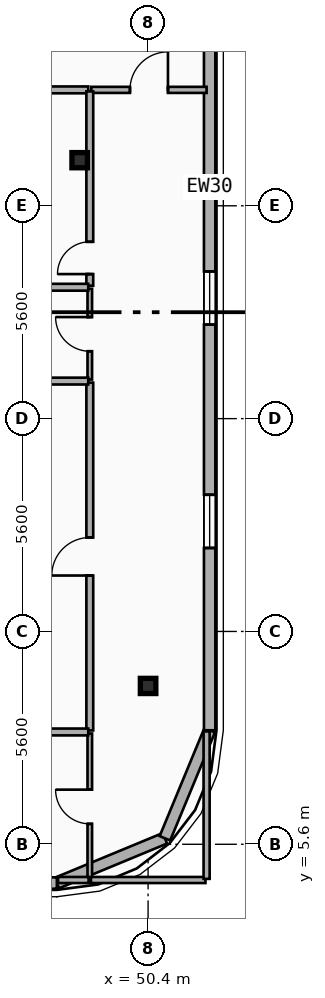
"""IFC4 building model, lengths in metres.
Left out: names, types, materials, properties, quantities, classifications, styles, units other than length and angle.
Written with IfcOpenShell. Run it as: python <this file> out.ifc"""

import sys

from ifc_helpers import new_model, si_unit, direction, frame, frame_2d, origin, origin_2d, place, context, subcontext, project, spatial, rectangle, i_section, extrude, element, fill, save


model = new_model("IFC4")
c1 = context("Model", 3, precision=1e-05, world=origin(), true_north=direction((0.0, 1.0)))
c2 = subcontext(c1, "Body", "Model", "MODEL_VIEW")
j1 = project(units=[si_unit("LENGTHUNIT", "METRE"), si_unit("PLANEANGLEUNIT", "RADIAN")], contexts=[c1])
p1 = place(None, origin())
s1 = spatial("IfcSite", under=j1, at=p1, CompositionType="ELEMENT")
p2 = place(p1, origin())
s2 = spatial("IfcBuilding", under=s1, at=p2, CompositionType="ELEMENT")
p3 = place(p2, frame((0.0, 0.0, 200.4)))
s3 = spatial("IfcBuildingStorey", under=s2, at=p3, CompositionType="ELEMENT", Elevation=200.4)
p4 = place(p3, frame((48.6, 23.6, 0.0), z_axis=(0.0, 0.0, 1.0), x_axis=(1.0, 0.0, 0.0)))
e1 = element("IfcColumn", 1, at=p4, inside=s3, PredefinedType="COLUMN", context=c2, shape_type="SweptSolid", body=[
    extrude(i_section(OverallWidth=0.408, OverallDepth=0.4, WebThickness=0.025, FlangeThickness=0.039, FilletRadius=0.015, at=origin_2d()), origin(), (0.0, 0.0, 1.0), 3.6),
])
p5 = place(p3, frame((50.4, 9.862, 0.0), z_axis=(0.0, -0.079833884609, 0.996808181582), x_axis=(1.0, 0.0, 0.0)))
e2 = element("IfcColumn", 2, at=p5, inside=s3, PredefinedType="COLUMN", context=c2, shape_type="SweptSolid", body=[
    extrude(i_section(OverallWidth=0.408, OverallDepth=0.4, WebThickness=0.025, FlangeThickness=0.039, FilletRadius=0.015, at=origin_2d()), origin(), (0.0, 0.0, 1.0), 3.612),
])
p6 = place(p3, frame((50.843, 5.757, 0.0), z_axis=(0.0, 0.0, 1.0), x_axis=(-0.92389884758, -0.382636798336, 0.0)))
e3 = element("IfcWall", 3, at=p6, inside=s3, PredefinedType="SOLIDWALL", context=c2, shape_type="SweptSolid", body=[
    extrude(rectangle(XDim=3.077, YDim=0.3, at=frame_2d((1.538, 0.0))), origin(), (0.0, 0.0, 1.0), 3.34),
])
p7 = place(p3, frame((52.02, 8.6, 0.0), z_axis=(0.0, 0.0, 1.0), x_axis=(-0.382676475685, -0.923882414032, 0.0)))
e4 = element("IfcWall", 4, at=p7, inside=s3, PredefinedType="SOLIDWALL", context=c2, shape_type="SweptSolid", body=[
    extrude(rectangle(XDim=3.077, YDim=0.3, at=frame_2d((1.539, 0.0))), origin(), (0.0, 0.0, 1.0), 3.34),
])
p8 = place(p3, frame((52.02, 37.2, 0.0), z_axis=(0.0, 0.0, 1.0), x_axis=(0.0, -1.0, 0.0)))
e5 = element("IfcWall", 5, at=p8, inside=s3, PredefinedType="SOLIDWALL", context=c2, shape_type="SweptSolid", body=[
    extrude(rectangle(XDim=28.6, YDim=0.3, at=frame_2d((14.3, 0.0))), origin(), (0.0, 0.0, 1.0), 3.34),
])
p9 = place(p8, frame((2.38, 0.0, 0.34)))
e6 = element("IfcOpeningElement", 6, at=p9, cuts=e5, PredefinedType="OPENING", context=c2, shape_type="SweptSolid", body=[
    extrude(rectangle(XDim=1.4, YDim=2.1, at=frame_2d((0.7, 1.05))), frame((0.0, 0.16, 0.0), z_axis=(0.0, -1.0, 0.0), x_axis=(1.0, 0.0, 0.0)), (0.0, 0.0, 1.0), 0.32),
])
p10 = place(p8, frame((5.84, 0.0, 0.34)))
e7 = element("IfcOpeningElement", 7, at=p10, cuts=e5, PredefinedType="OPENING", context=c2, shape_type="SweptSolid", body=[
    extrude(rectangle(XDim=1.4, YDim=2.1, at=frame_2d((0.7, 1.05))), frame((0.0, 0.16, 0.0), z_axis=(0.0, -1.0, 0.0), x_axis=(1.0, 0.0, 0.0)), (0.0, 0.0, 1.0), 0.32),
])
p11 = place(p8, frame((16.527, 0.0, 0.34)))
e8 = element("IfcOpeningElement", 8, at=p11, cuts=e5, PredefinedType="OPENING", context=c2, shape_type="SweptSolid", body=[
    extrude(rectangle(XDim=1.4, YDim=2.1, at=frame_2d((0.7, 1.05))), frame((0.0, 0.16, 0.0), z_axis=(0.0, -1.0, 0.0), x_axis=(1.0, 0.0, 0.0)), (0.0, 0.0, 1.0), 0.32),
])
p12 = place(p8, frame((22.403, 0.0, 0.34)))
e9 = element("IfcOpeningElement", 9, at=p12, cuts=e5, PredefinedType="OPENING", context=c2, shape_type="SweptSolid", body=[
    extrude(rectangle(XDim=1.4, YDim=2.1, at=frame_2d((0.7, 1.05))), frame((0.0, 0.16, 0.0), z_axis=(0.0, -1.0, 0.0), x_axis=(1.0, 0.0, 0.0)), (0.0, 0.0, 1.0), 0.32),
])
p13 = place(p3, frame((48.0, 4.58, 0.0), z_axis=(0.0, 0.0, 1.0), x_axis=(-1.0, 0.0, 0.0)))
e10 = element("IfcWall", 10, at=p13, inside=s3, PredefinedType="SOLIDWALL", context=c2, shape_type="SweptSolid", body=[
    extrude(rectangle(XDim=38.4, YDim=0.3, at=frame_2d((19.2, 0.0))), origin(), (0.0, 0.0, 1.0), 3.34),
])
p14 = place(p13, frame((36.19, 0.0, 0.8)))
e11 = element("IfcOpeningElement", 11, at=p14, cuts=e10, PredefinedType="OPENING", context=c2, shape_type="SweptSolid", body=[
    extrude(rectangle(XDim=1.8, YDim=1.8, at=frame_2d((0.9, 0.9))), frame((0.0, 0.16, 0.0), z_axis=(0.0, -1.0, 0.0), x_axis=(1.0, 0.0, 0.0)), (0.0, 0.0, 1.0), 0.32),
])
p15 = place(p13, frame((29.712, 0.0, 0.7)))
e12 = element("IfcOpeningElement", 12, at=p15, cuts=e10, PredefinedType="OPENING", context=c2, shape_type="SweptSolid", body=[
    extrude(rectangle(XDim=2.0, YDim=2.2, at=frame_2d((1.0, 1.1))), frame((0.0, 0.16, 0.0), z_axis=(0.0, -1.0, 0.0), x_axis=(1.0, 0.0, 0.0)), (0.0, 0.0, 1.0), 0.32),
])
p16 = place(p13, frame((33.038, 0.0, 0.7)))
e13 = element("IfcOpeningElement", 13, at=p16, cuts=e10, PredefinedType="OPENING", context=c2, shape_type="SweptSolid", body=[
    extrude(rectangle(XDim=2.0, YDim=2.2, at=frame_2d((1.0, 1.1))), frame((0.0, 0.16, 0.0), z_axis=(0.0, -1.0, 0.0), x_axis=(1.0, 0.0, 0.0)), (0.0, 0.0, 1.0), 0.32),
])
p17 = place(p13, frame((20.0, 0.0, 0.7)))
e14 = element("IfcOpeningElement", 14, at=p17, cuts=e10, PredefinedType="OPENING", context=c2, shape_type="SweptSolid", body=[
    extrude(rectangle(XDim=2.0, YDim=2.2, at=frame_2d((1.0, 1.1))), frame((0.0, 0.16, 0.0), z_axis=(0.0, -1.0, 0.0), x_axis=(1.0, 0.0, 0.0)), (0.0, 0.0, 1.0), 0.32),
])
p18 = place(p13, frame((25.2, 0.0, 0.7)))
e15 = element("IfcOpeningElement", 15, at=p18, cuts=e10, PredefinedType="OPENING", context=c2, shape_type="SweptSolid", body=[
    extrude(rectangle(XDim=2.0, YDim=2.2, at=frame_2d((1.0, 1.1))), frame((0.0, 0.16, 0.0), z_axis=(0.0, -1.0, 0.0), x_axis=(1.0, 0.0, 0.0)), (0.0, 0.0, 1.0), 0.32),
])
p19 = place(p13, frame((13.4, 0.0, 0.7)))
e16 = element("IfcOpeningElement", 16, at=p19, cuts=e10, PredefinedType="OPENING", context=c2, shape_type="SweptSolid", body=[
    extrude(rectangle(XDim=2.0, YDim=2.2, at=frame_2d((1.0, 1.1))), frame((0.0, 0.16, 0.0), z_axis=(0.0, -1.0, 0.0), x_axis=(1.0, 0.0, 0.0)), (0.0, 0.0, 1.0), 0.32),
])
p20 = place(p13, frame((6.993, 0.0, 0.7)))
e17 = element("IfcOpeningElement", 17, at=p20, cuts=e10, PredefinedType="OPENING", context=c2, shape_type="SweptSolid", body=[
    extrude(rectangle(XDim=2.0, YDim=2.2, at=frame_2d((1.0, 1.1))), frame((0.0, 0.16, 0.0), z_axis=(0.0, -1.0, 0.0), x_axis=(1.0, 0.0, 0.0)), (0.0, 0.0, 1.0), 0.32),
])
p21 = place(p13, frame((3.469, 0.0, 0.7)))
e18 = element("IfcOpeningElement", 18, at=p21, cuts=e10, PredefinedType="OPENING", context=c2, shape_type="SweptSolid", body=[
    extrude(rectangle(XDim=2.0, YDim=2.2, at=frame_2d((1.0, 1.1))), frame((0.0, 0.16, 0.0), z_axis=(0.0, -1.0, 0.0), x_axis=(1.0, 0.0, 0.0)), (0.0, 0.0, 1.0), 0.32),
])
p22 = place(p13, frame((0.41, 0.0, 0.8)))
e19 = element("IfcOpeningElement", 19, at=p22, cuts=e10, PredefinedType="OPENING", context=c2, shape_type="SweptSolid", body=[
    extrude(rectangle(XDim=1.8, YDim=1.8, at=frame_2d((0.9, 0.9))), frame((0.0, 0.16, 0.0), z_axis=(0.0, -1.0, 0.0), x_axis=(1.0, 0.0, 0.0)), (0.0, 0.0, 1.0), 0.32),
])
p23 = place(p3, frame((48.906, 25.45, 0.0), z_axis=(0.0, 0.0, 1.0), x_axis=(1.0, 0.0, 0.0)))
e20 = element("IfcWall", 20, at=p23, inside=s3, PredefinedType="PARTITIONING", context=c2, shape_type="SweptSolid", body=[
    extrude(rectangle(XDim=3.034, YDim=0.16, at=frame_2d((1.517, 0.0))), origin(), (0.0, 0.0, 1.0), 2.67),
])
p24 = place(p23, frame((1.017, 0.0, 0.0)))
e21 = element("IfcOpeningElement", 21, at=p24, cuts=e20, PredefinedType="OPENING", context=c2, shape_type="SweptSolid", body=[
    extrude(rectangle(XDim=1.0, YDim=2.15, at=frame_2d((0.5, 1.075))), frame((0.0, 0.09, 0.0), z_axis=(0.0, -1.0, 0.0), x_axis=(1.0, 0.0, 0.0)), (0.0, 0.0, 1.0), 0.18),
])
p25 = place(p3, frame((45.44, 25.45, 0.0), z_axis=(0.0, 0.0, 1.0), x_axis=(1.0, 0.0, 0.0)))
e22 = element("IfcWall", 22, at=p25, inside=s3, PredefinedType="PLUMBINGWALL", context=c2, shape_type="SweptSolid", body=[
    extrude(rectangle(XDim=3.386, YDim=0.18, at=frame_2d((1.693, 0.0))), origin(), (0.0, 0.0, 1.0), 2.42),
])
p26 = place(p3, frame((48.866, 4.66, 0.0), z_axis=(0.0, 0.0, 1.0), x_axis=(0.0, 1.0, 0.0)))
e23 = element("IfcWall", 23, at=p26, inside=s3, PredefinedType="PARTITIONING", context=c2, shape_type="SweptSolid", body=[
    extrude(rectangle(XDim=3.855, YDim=0.12, at=frame_2d((1.927, 0.0))), origin(), (0.0, 0.0, 1.0), 3.34),
])
p27 = place(p26, frame((1.478, 0.0, 0.0)))
e24 = element("IfcOpeningElement", 24, at=p27, cuts=e23, PredefinedType="OPENING", context=c2, shape_type="SweptSolid", body=[
    extrude(rectangle(XDim=0.9, YDim=2.1, at=frame_2d((0.45, 1.05))), frame((0.0, 0.07, 0.0), z_axis=(0.0, -1.0, 0.0), x_axis=(1.0, 0.0, 0.0)), (0.0, 0.0, 1.0), 0.14),
])
p28 = place(p3, frame((48.866, 8.595, 0.0), z_axis=(0.0, 0.0, 1.0), x_axis=(0.0, 1.0, 0.0)))
e25 = element("IfcWall", 25, at=p28, inside=s3, PredefinedType="PLUMBINGWALL", context=c2, shape_type="SweptSolid", body=[
    extrude(rectangle(XDim=9.153, YDim=0.18, at=frame_2d((4.577, 0.0))), origin(), (0.0, 0.0, 1.0), 2.82),
])
p29 = place(p28, frame((4.076, 0.0, 0.0)))
e26 = element("IfcOpeningElement", 26, at=p29, cuts=e25, PredefinedType="OPENING", context=c2, shape_type="SweptSolid", body=[
    extrude(rectangle(XDim=1.0, YDim=2.15, at=frame_2d((0.5, 1.075))), frame((0.0, 0.1, 0.0), z_axis=(0.0, -1.0, 0.0), x_axis=(1.0, 0.0, 0.0)), (0.0, 0.0, 1.0), 0.2),
])
p30 = place(p3, frame((48.866, 17.828, 0.0), z_axis=(0.0, 0.0, 1.0), x_axis=(0.0, 1.0, 0.0)))
e27 = element("IfcWall", 27, at=p30, inside=s3, PredefinedType="PARTITIONING", context=c2, shape_type="SweptSolid", body=[
    extrude(rectangle(XDim=2.389, YDim=0.12, at=frame_2d((1.195, 0.0))), origin(), (0.0, 0.0, 1.0), 2.82),
])
p31 = place(p30, frame((0.744, 0.0, 0.0)))
e28 = element("IfcOpeningElement", 28, at=p31, cuts=e27, PredefinedType="OPENING", context=c2, shape_type="SweptSolid", body=[
    extrude(rectangle(XDim=0.9, YDim=2.1, at=frame_2d((0.45, 1.05))), frame((0.0, 0.07, 0.0), z_axis=(0.0, -1.0, 0.0), x_axis=(1.0, 0.0, 0.0)), (0.0, 0.0, 1.0), 0.14),
])
p32 = place(p3, frame((48.866, 20.297, 0.0), z_axis=(0.0, 0.0, 1.0), x_axis=(0.0, 1.0, 0.0)))
e29 = element("IfcWall", 29, at=p32, inside=s3, PredefinedType="PLUMBINGWALL", context=c2, shape_type="SweptSolid", body=[
    extrude(rectangle(XDim=5.113, YDim=0.18, at=frame_2d((2.556, 0.0))), origin(), (0.0, 0.0, 1.0), 2.82),
])
p33 = place(p32, frame((0.306, 0.0, 0.0)))
e30 = element("IfcOpeningElement", 30, at=p33, cuts=e29, PredefinedType="OPENING", context=c2, shape_type="SweptSolid", body=[
    extrude(rectangle(XDim=0.85, YDim=2.1, at=frame_2d((0.425, 1.05))), frame((0.0, 0.1, 0.0), z_axis=(0.0, -1.0, 0.0), x_axis=(1.0, 0.0, 0.0)), (0.0, 0.0, 1.0), 0.2),
])
for number, where, z_axis, x_axis in (
    (31, (45.44, 8.555, 0.0), (0.0, 0.0, 1.0), (1.0, 0.0, 0.0)),
    (32, (45.44, 17.788, 0.0), (0.0, 0.0, 1.0), (1.0, 0.0, 0.0)),
    (33, (45.44, 20.257, 0.0), (0.0, 0.0, 1.0), (1.0, 0.0, 0.0)),
):
    element("IfcWall", number, at=place(p3, frame(where, z_axis=z_axis, x_axis=x_axis)), inside=s3, PredefinedType="PLUMBINGWALL", context=c2, shape_type="SweptSolid", body=[
        extrude(rectangle(XDim=3.386, YDim=0.18, at=frame_2d((1.693, 0.0))), origin(), (0.0, 0.0, 1.0), 2.42),
    ])
p34 = place(p3, frame((48.896, 4.66, 0.0), z_axis=(0.0, 0.0, 1.0), x_axis=(1.0, 0.0, 0.0)))
e34 = element("IfcWall", 34, at=p34, inside=s3, PredefinedType="PARTITIONING", context=c2, shape_type="SweptSolid", body=[
    extrude(rectangle(XDim=3.014, YDim=0.16, at=frame_2d((1.507, 0.0))), origin(), (0.0, 0.0, 1.0), 3.34),
])
p35 = place(p3, frame((51.94, 4.69, 0.0), z_axis=(0.0, 0.0, 1.0), x_axis=(0.0, 1.0, 0.0)))
e35 = element("IfcWall", 35, at=p35, inside=s3, PredefinedType="PARTITIONING", context=c2, shape_type="SweptSolid", body=[
    extrude(rectangle(XDim=3.88, YDim=0.16, at=frame_2d((1.94, 0.0))), origin(), (0.0, 0.0, 1.0), 3.34),
])
p36 = place(p3, frame((48.03, 4.66, 0.0), z_axis=(0.0, 0.0, 1.0), x_axis=(1.0, 0.0, 0.0)))
e36 = element("IfcWall", 36, at=p36, inside=s3, PredefinedType="PARTITIONING", context=c2, shape_type="SweptSolid", body=[
    extrude(rectangle(XDim=0.806, YDim=0.16, at=frame_2d((0.403, 0.0))), origin(), (0.0, 0.0, 1.0), 3.34),
])
p37 = place(p11, origin())
e37 = element("IfcWindow", 37, at=p37, inside=s3, PartitioningType="SINGLE_PANEL", PredefinedType="WINDOW", context=c2, shape_type="SweptSolid", body=[
    extrude(rectangle(XDim=1.4, YDim=2.1, at=frame_2d((0.7, 1.05))), frame((0.0, 0.03, 0.0), z_axis=(0.0, -1.0, 0.0), x_axis=(1.0, 0.0, 0.0)), (0.0, 0.0, 1.0), 0.06),
])
fill(e8, e37)
p38 = place(p12, origin())
e38 = element("IfcWindow", 38, at=p38, inside=s3, PartitioningType="SINGLE_PANEL", PredefinedType="WINDOW", context=c2, shape_type="SweptSolid", body=[
    extrude(rectangle(XDim=1.4, YDim=2.1, at=frame_2d((0.7, 1.05))), frame((0.0, 0.03, 0.0), z_axis=(0.0, -1.0, 0.0), x_axis=(1.0, 0.0, 0.0)), (0.0, 0.0, 1.0), 0.06),
])
fill(e9, e38)
p39 = place(p24, origin())
e39 = element("IfcDoor", 39, at=p39, inside=s3, OperationType="SINGLE_SWING_RIGHT", PredefinedType="DOOR", context=c2, shape_type="SweptSolid", body=[
    extrude(rectangle(XDim=1.0, YDim=2.15, at=frame_2d((0.5, 1.075))), frame((0.0, 0.025, 0.0), z_axis=(0.0, -1.0, 0.0), x_axis=(1.0, 0.0, 0.0)), (0.0, 0.0, 1.0), 0.05),
])
fill(e21, e39)
p40 = place(p27, origin())
e40 = element("IfcDoor", 40, at=p40, inside=s3, OperationType="SINGLE_SWING_RIGHT", PredefinedType="DOOR", context=c2, shape_type="SweptSolid", body=[
    extrude(rectangle(XDim=0.9, YDim=2.1, at=frame_2d((0.45, 1.05))), frame((0.0, 0.025, 0.0), z_axis=(0.0, -1.0, 0.0), x_axis=(1.0, 0.0, 0.0)), (0.0, 0.0, 1.0), 0.05),
])
fill(e24, e40)
p41 = place(p29, origin())
e41 = element("IfcDoor", 41, at=p41, inside=s3, OperationType="SINGLE_SWING_LEFT", PredefinedType="DOOR", context=c2, shape_type="SweptSolid", body=[
    extrude(rectangle(XDim=1.0, YDim=2.15, at=frame_2d((0.5, 1.075))), frame((0.0, 0.025, 0.0), z_axis=(0.0, -1.0, 0.0), x_axis=(1.0, 0.0, 0.0)), (0.0, 0.0, 1.0), 0.05),
])
fill(e26, e41)
p42 = place(p31, origin())
e42 = element("IfcDoor", 42, at=p42, inside=s3, OperationType="SINGLE_SWING_RIGHT", PredefinedType="DOOR", context=c2, shape_type="SweptSolid", body=[
    extrude(rectangle(XDim=0.9, YDim=2.1, at=frame_2d((0.45, 1.05))), frame((0.0, 0.025, 0.0), z_axis=(0.0, -1.0, 0.0), x_axis=(1.0, 0.0, 0.0)), (0.0, 0.0, 1.0), 0.05),
])
fill(e28, e42)
p43 = place(p33, origin())
e43 = element("IfcDoor", 43, at=p43, inside=s3, OperationType="SINGLE_SWING_LEFT", PredefinedType="DOOR", context=c2, shape_type="SweptSolid", body=[
    extrude(rectangle(XDim=0.85, YDim=2.1, at=frame_2d((0.425, 1.05))), frame((0.0, 0.025, 0.0), z_axis=(0.0, -1.0, 0.0), x_axis=(1.0, 0.0, 0.0)), (0.0, 0.0, 1.0), 0.05),
])
fill(e30, e43)
save(model, sys.argv[1])
